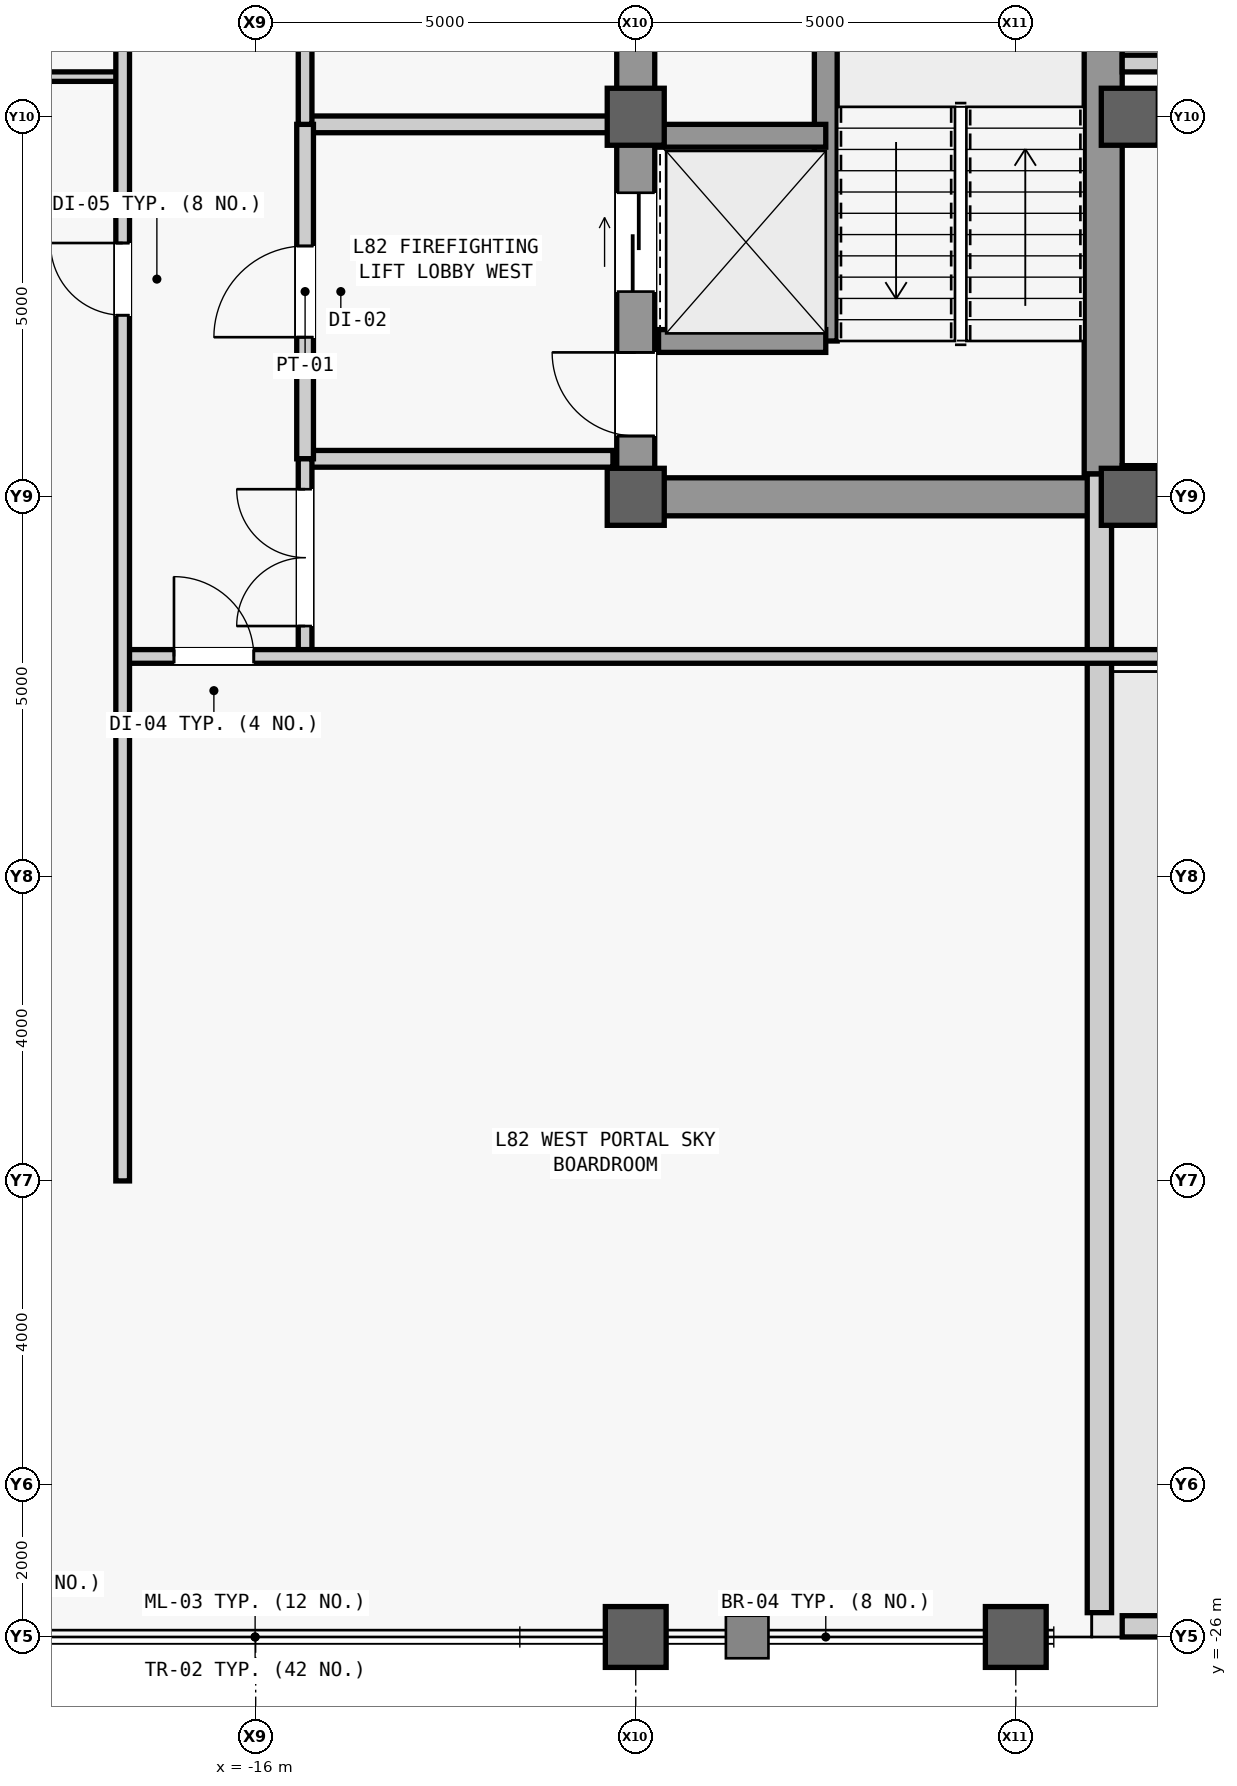
"""IFC4 building model, lengths in metres.
Left out: names, types, materials, properties, quantities, classifications, styles, units other than length and angle.
Written with IfcOpenShell. Run it as: python <this file> out.ifc"""

import sys

from ifc_helpers import new_model, si_unit, direction, frame, frame_2d, origin, origin_2d, place, context, subcontext, project, spatial, rectangle, hollow_rectangle, extrude, source, transform, mapped, element, fill, save


model = new_model("IFC4")
c1 = context("Model", 3, precision=1e-05, world=origin(), true_north=direction((0.0, 1.0)))
c2 = subcontext(c1, "Body", "Model", "MODEL_VIEW")
j1 = project(units=[si_unit("LENGTHUNIT", "METRE"), si_unit("PLANEANGLEUNIT", "RADIAN")], contexts=[c1])
p1 = place(None, origin())
s1 = spatial("IfcSite", under=j1, at=p1, CompositionType="ELEMENT")
p2 = place(p1, origin())
s2 = spatial("IfcBuilding", under=s1, at=p2, CompositionType="ELEMENT")
p3 = place(p2, frame((0.0, 0.0, 346.3)))
s3 = spatial("IfcBuildingStorey", under=s2, at=p3, CompositionType="ELEMENT", Elevation=346.3)
m1 = source(origin(), c2, "Body", "SweptSolid", [
    extrude(rectangle(XDim=22.0, YDim=0.5, at=frame_2d((11.0, 0.0))), origin(), (0.0, 0.0, 1.0), 3.74),
])
p4 = place(p3, frame((-11.0, -11.0, 0.0), z_axis=(0.0, 0.0, 1.0), x_axis=(0.0, 1.0, 0.0)))
e1 = element("IfcWall", 1, at=p4, inside=s3, PredefinedType="SHEAR", context=c2, shape_type="MappedRepresentation", body=[
    mapped(m1, transform((0.0, 0.0, 0.0), scale=1.0)),
])
m2 = source(origin(), c2, "Body", "SweptSolid", [
    extrude(rectangle(XDim=1.1, YDim=2.2, at=frame_2d((0.55, 1.1))), frame((0.0, 0.26, 0.0), z_axis=(0.0, -1.0, 0.0), x_axis=(1.0, 0.0, 0.0)), (0.0, 0.0, 1.0), 0.52),
])
p5 = place(p4, frame((0.8, 0.0, 0.0)))
e2 = element("IfcOpeningElement", 2, at=p5, cuts=e1, PredefinedType="OPENING", context=c2, shape_type="MappedRepresentation", body=[
    mapped(m2, transform((0.0, 0.0, 0.0), scale=1.0)),
])
p6 = place(p4, frame((12.5, 0.0, 0.0)))
e3 = element("IfcOpeningElement", 3, at=p6, cuts=e1, PredefinedType="OPENING", context=c2, shape_type="MappedRepresentation", body=[
    mapped(m2, transform((0.0, 0.0, 0.0), scale=1.0)),
])
m3 = source(origin(), c2, "Body", "SweptSolid", [
    extrude(rectangle(XDim=0.9, YDim=2.15, at=frame_2d((0.45, 1.075))), frame((0.0, 0.26, 0.0), z_axis=(0.0, -1.0, 0.0), x_axis=(1.0, 0.0, 0.0)), (0.0, 0.0, 1.0), 0.52),
])
p7 = place(p4, frame((6.85, 0.0, 0.0)))
e4 = element("IfcOpeningElement", 4, at=p7, cuts=e1, PredefinedType="OPENING", context=c2, shape_type="MappedRepresentation", body=[
    mapped(m3, transform((0.0, 0.0, 0.0), scale=1.0)),
])
m4 = source(origin(), c2, "Body", "SweptSolid", [
    extrude(rectangle(XDim=1.2, YDim=2.3, at=frame_2d((0.6, 1.15))), frame((0.0, 0.26, 0.0), z_axis=(0.0, -1.0, 0.0), x_axis=(1.0, 0.0, 0.0)), (0.0, 0.0, 1.0), 0.52),
])
p8 = place(p4, frame((14.6, 0.0, 0.0)))
e5 = element("IfcOpeningElement", 5, at=p8, cuts=e1, PredefinedType="OPENING", context=c2, shape_type="MappedRepresentation", body=[
    mapped(m4, transform((0.0, 0.0, 0.0), scale=1.0)),
])
p9 = place(p4, frame((18.2, 0.0, 0.0)))
e6 = element("IfcOpeningElement", 6, at=p9, cuts=e1, PredefinedType="OPENING", context=c2, shape_type="MappedRepresentation", body=[
    mapped(m4, transform((0.0, 0.0, 0.0), scale=1.0)),
])
m5 = source(origin(), c2, "Body", "SweptSolid", [
    extrude(rectangle(XDim=1.3, YDim=2.3, at=frame_2d((0.65, 1.15))), frame((0.0, 0.26, 0.0), z_axis=(0.0, -1.0, 0.0), x_axis=(1.0, 0.0, 0.0)), (0.0, 0.0, 1.0), 0.52),
])
p10 = place(p4, frame((2.7, 0.0, 0.0)))
e7 = element("IfcOpeningElement", 7, at=p10, cuts=e1, PredefinedType="OPENING", context=c2, shape_type="MappedRepresentation", body=[
    mapped(m5, transform((0.0, 0.0, 0.0), scale=1.0)),
])
m6 = source(origin(), c2, "Body", "SweptSolid", [
    extrude(rectangle(XDim=21.4, YDim=0.5, at=frame_2d((10.7, 0.0))), origin(), (0.0, 0.0, 1.0), 3.74),
])
p11 = place(p3, frame((-4.85, -10.7, 0.0), z_axis=(0.0, 0.0, 1.0), x_axis=(0.0, 1.0, 0.0)))
e8 = element("IfcWall", 8, at=p11, inside=s3, PredefinedType="SHEAR", context=c2, shape_type="MappedRepresentation", body=[
    mapped(m6, transform((0.0, 0.0, 0.0), scale=1.0)),
])
m7 = source(origin(), c2, "Body", "SweptSolid", [
    extrude(rectangle(XDim=5.9, YDim=0.5, at=frame_2d((2.95, 0.0))), origin(), (0.0, 0.0, 1.0), 3.74),
])
p12 = place(p3, frame((-10.75, -11.0, 0.0), z_axis=(0.0, 0.0, 1.0), x_axis=(1.0, 0.0, 0.0)))
e9 = element("IfcWall", 9, at=p12, inside=s3, PredefinedType="SHEAR", context=c2, shape_type="MappedRepresentation", body=[
    mapped(m7, transform((0.0, 0.0, 0.0), scale=1.0)),
])
m8 = source(origin(), c2, "Body", "SweptSolid", [
    extrude(hollow_rectangle(XDim=0.8, YDim=0.8, WallThickness=0.045, at=origin_2d()), origin(), (0.0, 0.0, 1.0), 4.0),
])
p13 = place(p3, frame((-11.0, -26.0, 0.0), z_axis=(0.0, 0.0, 1.0), x_axis=(1.0, 0.0, 0.0)))
e10 = element("IfcColumn", 10, at=p13, inside=s3, PredefinedType="COLUMN", context=c2, shape_type="MappedRepresentation", body=[
    mapped(m8, transform((0.0, 0.0, 0.0), scale=1.0)),
])
m9 = source(origin(), c2, "Body", "SweptSolid", [
    extrude(rectangle(XDim=0.75, YDim=0.75, at=origin_2d()), origin(), (0.0, 0.0, 1.0), 4.0),
])
for number, where, z_axis, x_axis in (
    (11, (-11.0, -11.0, 0.0), (0.0, 0.0, 1.0), (1.0, 0.0, 0.0)),
    (12, (-11.0, -6.0, 0.0), (0.0, 0.0, 1.0), (1.0, 0.0, 0.0)),
):
    element("IfcColumn", number, at=place(p3, frame(where, z_axis=z_axis, x_axis=x_axis)), inside=s3, PredefinedType="COLUMN", context=c2, shape_type="MappedRepresentation", body=[
        mapped(m9, transform((0.0, 0.0, 0.0), scale=1.0)),
    ])
p14 = place(p3, frame((-6.0, -26.0, 0.0), z_axis=(0.0, 0.0, 1.0), x_axis=(1.0, 0.0, 0.0)))
e13 = element("IfcColumn", 13, at=p14, inside=s3, PredefinedType="COLUMN", context=c2, shape_type="MappedRepresentation", body=[
    mapped(m8, transform((0.0, 0.0, 0.0), scale=1.0)),
])
for number, where, z_axis, x_axis in (
    (14, (-4.5, -11.0, 0.0), (0.0, 0.0, 1.0), (1.0, 0.0, 0.0)),
    (15, (-4.5, -6.0, 0.0), (0.0, 0.0, 1.0), (1.0, 0.0, 0.0)),
):
    element("IfcColumn", number, at=place(p3, frame(where, z_axis=z_axis, x_axis=x_axis)), inside=s3, PredefinedType="COLUMN", context=c2, shape_type="MappedRepresentation", body=[
        mapped(m9, transform((0.0, 0.0, 0.0), scale=1.0)),
    ])
m10 = source(origin(), c2, "Body", "SweptSolid", [
    extrude(rectangle(XDim=9.2, YDim=0.28, at=frame_2d((4.6, 0.0))), origin(), (0.0, 0.0, 1.0), 1.2),
])
p15 = place(p3, frame((-4.6, -25.86, 0.0), z_axis=(0.0, 0.0, 1.0), x_axis=(1.0, 0.0, 0.0)))
e16 = element("IfcWall", 16, at=p15, inside=s3, PredefinedType="PARAPET", context=c2, shape_type="MappedRepresentation", body=[
    mapped(m10, transform((0.0, 0.0, 0.0), scale=1.0)),
])
m11 = source(origin(), c2, "Body", "SweptSolid", [
    extrude(rectangle(XDim=14.98, YDim=0.32, at=frame_2d((7.49, 0.0))), origin(), (0.0, 0.0, 1.0), 3.045),
])
p16 = place(p3, frame((-4.9, -25.68, 0.0), z_axis=(0.0, 0.0, 1.0), x_axis=(0.0, 1.0, 0.0)))
e17 = element("IfcWall", 17, at=p16, inside=s3, PredefinedType="STANDARD", context=c2, shape_type="MappedRepresentation", body=[
    mapped(m11, transform((0.0, 0.0, 0.0), scale=1.0)),
])
m12 = source(origin(), c2, "Body", "SweptSolid", [
    extrude(rectangle(XDim=7.8, YDim=0.3, at=frame_2d((3.9, 0.0))), origin(), (0.0, 0.0, 1.0), 3.74),
])
p17 = place(p3, frame((-8.5, -8.95, 0.0), z_axis=(0.0, 0.0, 1.0), x_axis=(0.0, 1.0, 0.0)))
e18 = element("IfcWall", 18, at=p17, inside=s3, PredefinedType="SHEAR", context=c2, shape_type="MappedRepresentation", body=[
    mapped(m12, transform((0.0, 0.0, 0.0), scale=1.0)),
])
m13 = source(origin(), c2, "Body", "SweptSolid", [
    extrude(rectangle(XDim=2.2, YDim=0.3, at=frame_2d((1.1, 0.0))), origin(), (0.0, 0.0, 1.0), 3.74),
])
for number, where, z_axis, x_axis in (
    (19, (-10.7, -8.95, 0.0), (0.0, 0.0, 1.0), (1.0, 0.0, 0.0)),
    (20, (-10.7, -6.25, 0.0), (0.0, 0.0, 1.0), (1.0, 0.0, 0.0)),
):
    element("IfcWall", number, at=place(p3, frame(where, z_axis=z_axis, x_axis=x_axis)), inside=s3, PredefinedType="SHEAR", context=c2, shape_type="MappedRepresentation", body=[
        mapped(m13, transform((0.0, 0.0, 0.0), scale=1.0)),
    ])
m14 = source(origin(), c2, "Body", "SweptSolid", [
    extrude(rectangle(XDim=4.05, YDim=0.22, at=frame_2d((2.025, 0.0))), origin(), (0.0, 0.0, 1.0), 3.74),
])
p18 = place(p3, frame((-15.35, -10.5, 0.0), z_axis=(0.0, 0.0, 1.0), x_axis=(1.0, 0.0, 0.0)))
e21 = element("IfcWall", 21, at=p18, inside=s3, PredefinedType="PARTITIONING", context=c2, shape_type="MappedRepresentation", body=[
    mapped(m14, transform((0.0, 0.0, 0.0), scale=1.0)),
])
m15 = source(origin(), c2, "Body", "SweptSolid", [
    extrude(rectangle(XDim=4.05, YDim=0.22, at=frame_2d((2.025, 0.0))), origin(), (0.0, 0.0, 1.0), 3.124),
])
p19 = place(p3, frame((-15.35, -6.1, 0.0), z_axis=(0.0, 0.0, 1.0), x_axis=(1.0, 0.0, 0.0)))
e22 = element("IfcWall", 22, at=p19, inside=s3, PredefinedType="PARTITIONING", context=c2, shape_type="MappedRepresentation", body=[
    mapped(m15, transform((0.0, 0.0, 0.0), scale=1.0)),
])
m16 = source(origin(), c2, "Body", "SweptSolid", [
    extrude(rectangle(XDim=4.4, YDim=0.22, at=frame_2d((2.2, 0.0))), origin(), (0.0, 0.0, 1.0), 3.74),
])
p20 = place(p3, frame((-15.35, -10.5, 0.0), z_axis=(0.0, 0.0, 1.0), x_axis=(0.0, 1.0, 0.0)))
e23 = element("IfcWall", 23, at=p20, inside=s3, PredefinedType="PARTITIONING", context=c2, shape_type="MappedRepresentation", body=[
    mapped(m16, transform((0.0, 0.0, 0.0), scale=1.0)),
])
m17 = source(origin(), c2, "Body", "SweptSolid", [
    extrude(rectangle(XDim=1.2, YDim=2.2, at=frame_2d((0.6, 1.1))), frame((0.0, 0.12, 0.0), z_axis=(0.0, -1.0, 0.0), x_axis=(1.0, 0.0, 0.0)), (0.0, 0.0, 1.0), 0.24),
])
p21 = place(p20, frame((1.6, 0.0, 0.0)))
e24 = element("IfcOpeningElement", 24, at=p21, cuts=e23, PredefinedType="OPENING", context=c2, shape_type="MappedRepresentation", body=[
    mapped(m17, transform((0.0, 0.0, 0.0), scale=1.0)),
])
m18 = source(origin(), c2, "Body", "SweptSolid", [
    extrude(rectangle(XDim=16.6, YDim=0.18, at=frame_2d((8.3, 0.0))), origin(), (0.0, 0.0, 1.0), 3.74),
])
p22 = place(p3, frame((-15.35, -6.1, 0.0), z_axis=(0.0, 0.0, 1.0), x_axis=(0.0, 1.0, 0.0)))
e25 = element("IfcWall", 25, at=p22, inside=s3, PredefinedType="PARTITIONING", context=c2, shape_type="MappedRepresentation", body=[
    mapped(m18, transform((0.0, 0.0, 0.0), scale=1.0)),
])
m19 = source(origin(), c2, "Body", "SweptSolid", [
    extrude(rectangle(XDim=1.8, YDim=2.25, at=frame_2d((0.9, 1.125))), frame((0.0, 0.1, 0.0), z_axis=(0.0, -1.0, 0.0), x_axis=(1.0, 0.0, 0.0)), (0.0, 0.0, 1.0), 0.2),
])
p23 = place(p22, frame((2.7, 0.0, 0.0)))
e26 = element("IfcOpeningElement", 26, at=p23, cuts=e25, PredefinedType="OPENING", context=c2, shape_type="MappedRepresentation", body=[
    mapped(m19, transform((0.0, 0.0, 0.0), scale=1.0)),
])
p24 = place(p22, frame((11.0, 0.0, 0.0)))
e27 = element("IfcOpeningElement", 27, at=p24, cuts=e25, PredefinedType="OPENING", context=c2, shape_type="MappedRepresentation", body=[
    mapped(m19, transform((0.0, 0.0, 0.0), scale=1.0)),
])
m20 = source(origin(), c2, "Body", "SweptSolid", [
    extrude(rectangle(XDim=9.2, YDim=0.22, at=frame_2d((4.6, 0.0))), origin(), (0.0, 0.0, 1.0), 3.74),
])
p25 = place(p3, frame((-4.6, -10.7, 0.0), z_axis=(0.0, 0.0, 1.0), x_axis=(1.0, 0.0, 0.0)))
e28 = element("IfcWall", 28, at=p25, inside=s3, PredefinedType="PARTITIONING", context=c2, shape_type="MappedRepresentation", body=[
    mapped(m20, transform((0.0, 0.0, 0.0), scale=1.0)),
])
m21 = source(origin(), c2, "Body", "SweptSolid", [
    extrude(rectangle(XDim=0.95, YDim=2.15, at=frame_2d((0.475, 1.075))), frame((0.0, 0.12, 0.0), z_axis=(0.0, -1.0, 0.0), x_axis=(1.0, 0.0, 0.0)), (0.0, 0.0, 1.0), 0.24),
])
p26 = place(p25, frame((1.425, 0.0, 0.0)))
e29 = element("IfcOpeningElement", 29, at=p26, cuts=e28, PredefinedType="OPENING", context=c2, shape_type="MappedRepresentation", body=[
    mapped(m21, transform((0.0, 0.0, 0.0), scale=1.0)),
])
p27 = place(p25, frame((6.025, 0.0, 0.0)))
e30 = element("IfcOpeningElement", 30, at=p27, cuts=e28, PredefinedType="OPENING", context=c2, shape_type="MappedRepresentation", body=[
    mapped(m21, transform((0.0, 0.0, 0.0), scale=1.0)),
])
p28 = place(p3, frame((-4.6, -5.3, 0.0), z_axis=(0.0, 0.0, 1.0), x_axis=(1.0, 0.0, 0.0)))
e31 = element("IfcWall", 31, at=p28, inside=s3, PredefinedType="PARTITIONING", context=c2, shape_type="MappedRepresentation", body=[
    mapped(m20, transform((0.0, 0.0, 0.0), scale=1.0)),
])
m22 = source(origin(), c2, "Body", "SweptSolid", [
    extrude(rectangle(XDim=2.6, YDim=0.18, at=frame_2d((1.3, 0.0))), origin(), (0.0, 0.0, 1.0), 3.74),
])
p29 = place(p3, frame((-15.35, -13.1, 0.0), z_axis=(0.0, 0.0, 1.0), x_axis=(0.0, 1.0, 0.0)))
e32 = element("IfcWall", 32, at=p29, inside=s3, PredefinedType="PARTITIONING", context=c2, shape_type="MappedRepresentation", body=[
    mapped(m22, transform((0.0, 0.0, 0.0), scale=1.0)),
])
p30 = place(p29, frame((0.4, 0.0, 0.0)))
e33 = element("IfcOpeningElement", 33, at=p30, cuts=e32, PredefinedType="OPENING", context=c2, shape_type="MappedRepresentation", body=[
    mapped(m19, transform((0.0, 0.0, 0.0), scale=1.0)),
])
m23 = source(origin(), c2, "Body", "SweptSolid", [
    extrude(rectangle(XDim=22.55, YDim=0.18, at=frame_2d((11.275, 0.0))), origin(), (0.0, 0.0, 1.0), 3.74),
])
p31 = place(p3, frame((-17.75, -13.1, 0.0), z_axis=(0.0, 0.0, 1.0), x_axis=(1.0, 0.0, 0.0)))
e34 = element("IfcWall", 34, at=p31, inside=s3, PredefinedType="PARTITIONING", context=c2, shape_type="MappedRepresentation", body=[
    mapped(m23, transform((0.0, 0.0, 0.0), scale=1.0)),
])
m24 = source(origin(), c2, "Body", "SweptSolid", [
    extrude(rectangle(XDim=1.05, YDim=2.2, at=frame_2d((0.525, 1.1))), frame((0.0, 0.1, 0.0), z_axis=(0.0, -1.0, 0.0), x_axis=(1.0, 0.0, 0.0)), (0.0, 0.0, 1.0), 0.2),
])
p32 = place(p31, frame((0.675, 0.0, 0.0)))
e35 = element("IfcOpeningElement", 35, at=p32, cuts=e34, PredefinedType="OPENING", context=c2, shape_type="MappedRepresentation", body=[
    mapped(m24, transform((0.0, 0.0, 0.0), scale=1.0)),
])
m25 = source(origin(), c2, "Body", "SweptSolid", [
    extrude(rectangle(XDim=8.25, YDim=0.125, at=frame_2d((4.125, 0.0))), origin(), (0.0, 0.0, 1.0), 3.74),
])
p33 = place(p3, frame((-26.0, -5.472, 0.0), z_axis=(0.0, 0.0, 1.0), x_axis=(1.0, 0.0, 0.0)))
e36 = element("IfcWall", 36, at=p33, inside=s3, PredefinedType="PARTITIONING", context=c2, shape_type="MappedRepresentation", body=[
    mapped(m25, transform((0.0, 0.0, 0.0), scale=1.0)),
])
m26 = source(origin(), c2, "Body", "SweptSolid", [
    extrude(rectangle(XDim=40.0, YDim=0.18, at=frame_2d((20.0, 0.0))), origin(), (0.0, 0.0, 1.0), 3.74),
])
p34 = place(p3, frame((-17.75, -20.0, 0.0), z_axis=(0.0, 0.0, 1.0), x_axis=(0.0, 1.0, 0.0)))
e37 = element("IfcWall", 37, at=p34, inside=s3, PredefinedType="PARTITIONING", context=c2, shape_type="MappedRepresentation", body=[
    mapped(m26, transform((0.0, 0.0, 0.0), scale=1.0)),
])
m27 = source(origin(), c2, "Body", "SweptSolid", [
    extrude(rectangle(XDim=0.95, YDim=2.15, at=frame_2d((0.475, 1.075))), frame((0.0, 0.1, 0.0), z_axis=(0.0, -1.0, 0.0), x_axis=(1.0, 0.0, 0.0)), (0.0, 0.0, 1.0), 0.2),
])
p35 = place(p34, frame((11.389, 0.0, 0.0)))
e38 = element("IfcOpeningElement", 38, at=p35, cuts=e37, PredefinedType="OPENING", context=c2, shape_type="MappedRepresentation", body=[
    mapped(m27, transform((0.0, 0.0, 0.0), scale=1.0)),
])
p36 = place(p34, frame((17.473, 0.0, 0.0)))
e39 = element("IfcOpeningElement", 39, at=p36, cuts=e37, PredefinedType="OPENING", context=c2, shape_type="MappedRepresentation", body=[
    mapped(m27, transform((0.0, 0.0, 0.0), scale=1.0)),
])
p37 = place(p34, frame((23.857, 0.0, 0.0)))
e40 = element("IfcOpeningElement", 40, at=p37, cuts=e37, PredefinedType="OPENING", context=c2, shape_type="MappedRepresentation", body=[
    mapped(m27, transform((0.0, 0.0, 0.0), scale=1.0)),
])
p38 = place(p34, frame((28.573, 0.0, 0.0)))
e41 = element("IfcOpeningElement", 41, at=p38, cuts=e37, PredefinedType="OPENING", context=c2, shape_type="MappedRepresentation", body=[
    mapped(m27, transform((0.0, 0.0, 0.0), scale=1.0)),
])
m28 = source(origin(), c2, "Body", "SweptSolid", [
    extrude(rectangle(XDim=1.1, YDim=2.2, at=frame_2d((0.55, 1.1))), frame((0.0, 0.025, 0.0), z_axis=(0.0, -1.0, 0.0), x_axis=(1.0, 0.0, 0.0)), (0.0, 0.0, 1.0), 0.05),
])
p39 = place(p5, origin())
e42 = element("IfcDoor", 42, at=p39, inside=s3, OperationType="SINGLE_SWING_RIGHT", PredefinedType="DOOR", context=c2, shape_type="MappedRepresentation", body=[
    mapped(m28, transform((0.0, 0.0, 0.0), scale=1.0)),
])
fill(e2, e42)
m29 = source(origin(), c2, "Body", "SweptSolid", [
    extrude(rectangle(XDim=1.2, YDim=2.2, at=frame_2d((0.6, 1.1))), frame((0.0, 0.025, 0.0), z_axis=(0.0, -1.0, 0.0), x_axis=(1.0, 0.0, 0.0)), (0.0, 0.0, 1.0), 0.05),
])
p40 = place(p21, origin())
e43 = element("IfcDoor", 43, at=p40, inside=s3, OperationType="SINGLE_SWING_LEFT", PredefinedType="DOOR", context=c2, shape_type="MappedRepresentation", body=[
    mapped(m29, transform((0.0, 0.0, 0.0), scale=1.0)),
])
fill(e24, e43)
m30 = source(origin(), c2, "Body", "SweptSolid", [
    extrude(rectangle(XDim=1.8, YDim=2.25, at=frame_2d((0.9, 1.125))), frame((0.0, 0.025, 0.0), z_axis=(0.0, -1.0, 0.0), x_axis=(1.0, 0.0, 0.0)), (0.0, 0.0, 1.0), 0.05),
])
p41 = place(p30, origin())
e44 = element("IfcDoor", 44, at=p41, inside=s3, OperationType="DOUBLE_DOOR_SINGLE_SWING", PredefinedType="DOOR", context=c2, shape_type="MappedRepresentation", body=[
    mapped(m30, transform((0.0, 0.0, 0.0), scale=1.0)),
])
fill(e33, e44)
m31 = source(origin(), c2, "Body", "SweptSolid", [
    extrude(rectangle(XDim=1.05, YDim=2.2, at=frame_2d((0.525, 1.1))), frame((0.0, 0.025, 0.0), z_axis=(0.0, -1.0, 0.0), x_axis=(1.0, 0.0, 0.0)), (0.0, 0.0, 1.0), 0.05),
])
p42 = place(p32, origin())
e45 = element("IfcDoor", 45, at=p42, inside=s3, OperationType="SINGLE_SWING_LEFT", PredefinedType="DOOR", context=c2, shape_type="MappedRepresentation", body=[
    mapped(m31, transform((0.0, 0.0, 0.0), scale=1.0)),
])
fill(e35, e45)
m32 = source(origin(), c2, "Body", "SweptSolid", [
    extrude(rectangle(XDim=0.95, YDim=2.15, at=frame_2d((0.475, 1.075))), frame((0.0, 0.025, 0.0), z_axis=(0.0, -1.0, 0.0), x_axis=(1.0, 0.0, 0.0)), (0.0, 0.0, 1.0), 0.05),
])
p43 = place(p35, origin())
e46 = element("IfcDoor", 46, at=p43, inside=s3, OperationType="SINGLE_SWING_RIGHT", PredefinedType="DOOR", context=c2, shape_type="MappedRepresentation", body=[
    mapped(m32, transform((0.0, 0.0, 0.0), scale=1.0)),
])
fill(e38, e46)
m33 = source(origin(), c2, "Body", "SweptSolid", [
    extrude(rectangle(XDim=1.3, YDim=2.3, at=frame_2d((0.65, 1.15))), frame((0.0, 0.025, 0.0), z_axis=(0.0, -1.0, 0.0), x_axis=(1.0, 0.0, 0.0)), (0.0, 0.0, 1.0), 0.05),
])
p44 = place(p10, origin())
e47 = element("IfcDoor", 47, at=p44, inside=s3, OperationType="SLIDING_TO_LEFT", PredefinedType="DOOR", context=c2, shape_type="MappedRepresentation", body=[
    mapped(m33, transform((0.0, 0.0, 0.0), scale=1.0)),
])
fill(e7, e47)
save(model, sys.argv[1])
